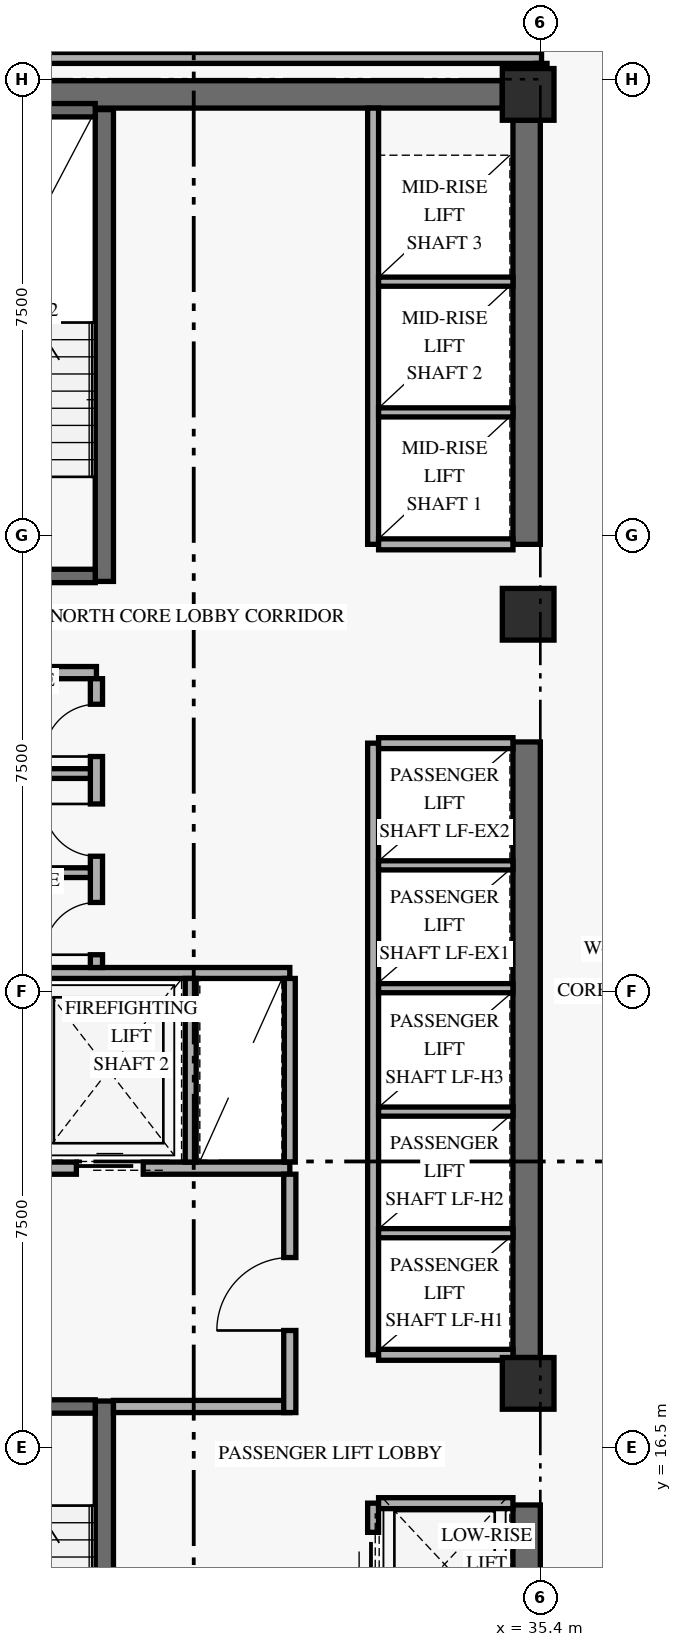
"""IFC4 building model, lengths in metres.
Left out: names, types, materials, properties, quantities, classifications, styles, units other than length and angle.
Written with IfcOpenShell. Run it as: python <this file> out.ifc"""

import sys

from ifc_helpers import new_model, si_unit, direction, frame, frame_2d, origin, origin_2d, place, context, subcontext, project, spatial, rectangle, extrude, element, fill, save


model = new_model("IFC4")
c1 = context("Model", 3, precision=1e-05, world=origin(), true_north=direction((0.0, 1.0)))
c2 = subcontext(c1, "Body", "Model", "MODEL_VIEW")
j1 = project(units=[si_unit("LENGTHUNIT", "METRE"), si_unit("PLANEANGLEUNIT", "RADIAN")], contexts=[c1])
p1 = place(None, origin())
s1 = spatial("IfcSite", under=j1, at=p1, CompositionType="ELEMENT")
p2 = place(p1, origin())
s2 = spatial("IfcBuilding", under=s1, at=p2, CompositionType="ELEMENT")
p3 = place(p2, frame((0.0, 0.0, 31.2)))
s3 = spatial("IfcBuildingStorey", under=s2, at=p3, CompositionType="ELEMENT", Elevation=31.2)
p4 = place(p3, frame((35.175, 9.675, 0.0), z_axis=(0.0, 0.0, 1.0), x_axis=(0.0, 1.0, 0.0)))
e1 = element("IfcWall", 1, at=p4, inside=s3, PredefinedType="SHEAR", context=c2, shape_type="SweptSolid", body=[
    extrude(rectangle(XDim=5.875, YDim=0.45, at=frame_2d((2.938, 0.0))), origin(), (0.0, 0.0, 1.0), 2.667),
])
p5 = place(p3, frame((35.175, 17.975, 0.0), z_axis=(0.0, 0.0, 1.0), x_axis=(0.0, 1.0, 0.0)))
e2 = element("IfcWall", 2, at=p5, inside=s3, PredefinedType="SHEAR", context=c2, shape_type="SweptSolid", body=[
    extrude(rectangle(XDim=10.125, YDim=0.45, at=frame_2d((5.062, 0.0))), origin(), (0.0, 0.0, 1.0), 2.667),
])
p6 = place(p3, frame((35.175, 31.35, 0.0), z_axis=(0.0, 0.0, 1.0), x_axis=(0.0, 1.0, 0.0)))
e3 = element("IfcWall", 3, at=p6, inside=s3, PredefinedType="SHEAR", context=c2, shape_type="SweptSolid", body=[
    extrude(rectangle(XDim=6.975, YDim=0.45, at=frame_2d((3.487, 0.0))), origin(), (0.0, 0.0, 1.0), 2.667),
])
p7 = place(p3, frame((24.625, 38.75, 0.0), z_axis=(0.0, 0.0, 1.0), x_axis=(1.0, 0.0, 0.0)))
e4 = element("IfcWall", 4, at=p7, inside=s3, PredefinedType="SHEAR", context=c2, shape_type="SweptSolid", body=[
    extrude(rectangle(XDim=10.15, YDim=0.45, at=frame_2d((5.075, 0.0))), origin(), (0.0, 0.0, 1.0), 3.36),
])
p8 = place(p3, frame((28.23, 9.5, 0.0), z_axis=(0.0, 0.0, 1.0), x_axis=(0.0, 1.0, 0.0)))
e5 = element("IfcWall", 5, at=p8, inside=s3, PredefinedType="SHEAR", context=c2, shape_type="SweptSolid", body=[
    extrude(rectangle(XDim=7.76, YDim=0.3, at=frame_2d((3.88, 0.0))), origin(), (0.0, 0.0, 1.0), 3.36),
])
p9 = place(p3, frame((24.92, 17.17, 0.0), z_axis=(0.0, 0.0, 1.0), x_axis=(1.0, 0.0, 0.0)))
e6 = element("IfcWall", 6, at=p9, inside=s3, PredefinedType="SHEAR", context=c2, shape_type="SweptSolid", body=[
    extrude(rectangle(XDim=3.16, YDim=0.22, at=frame_2d((1.58, 0.0))), origin(), (0.0, 0.0, 1.0), 3.36),
])
p10 = place(p9, frame((0.78, 0.0, 0.0)))
e7 = element("IfcOpeningElement", 7, at=p10, cuts=e6, PredefinedType="OPENING", context=c2, shape_type="SweptSolid", body=[
    extrude(rectangle(XDim=1.05, YDim=2.15, at=frame_2d((0.525, 1.075))), frame((0.0, 0.12, 0.0), z_axis=(0.0, -1.0, 0.0), x_axis=(1.0, 0.0, 0.0)), (0.0, 0.0, 1.0), 0.24),
])
p11 = place(p3, frame((28.23, 30.74, 0.0), z_axis=(0.0, 0.0, 1.0), x_axis=(0.0, 1.0, 0.0)))
e8 = element("IfcWall", 8, at=p11, inside=s3, PredefinedType="SHEAR", context=c2, shape_type="SweptSolid", body=[
    extrude(rectangle(XDim=7.76, YDim=0.3, at=frame_2d((3.88, 0.0))), origin(), (0.0, 0.0, 1.0), 3.36),
])
p12 = place(p3, frame((24.92, 30.83, 0.0), z_axis=(0.0, 0.0, 1.0), x_axis=(1.0, 0.0, 0.0)))
e9 = element("IfcWall", 9, at=p12, inside=s3, PredefinedType="SHEAR", context=c2, shape_type="SweptSolid", body=[
    extrude(rectangle(XDim=3.16, YDim=0.22, at=frame_2d((1.58, 0.0))), origin(), (0.0, 0.0, 1.0), 3.36),
])
p13 = place(p12, frame((0.78, 0.0, 0.0)))
e10 = element("IfcOpeningElement", 10, at=p13, cuts=e9, PredefinedType="OPENING", context=c2, shape_type="SweptSolid", body=[
    extrude(rectangle(XDim=1.05, YDim=2.15, at=frame_2d((0.525, 1.075))), frame((0.0, 0.12, 0.0), z_axis=(0.0, -1.0, 0.0), x_axis=(1.0, 0.0, 0.0)), (0.0, 0.0, 1.0), 0.24),
])
p14 = place(p3, frame((24.92, 38.49, 0.0), z_axis=(0.0, 0.0, 1.0), x_axis=(1.0, 0.0, 0.0)))
e11 = element("IfcWall", 11, at=p14, inside=s3, PredefinedType="SHEAR", context=c2, shape_type="SweptSolid", body=[
    extrude(rectangle(XDim=3.16, YDim=0.22, at=frame_2d((1.58, 0.0))), origin(), (0.0, 0.0, 1.0), 3.36),
])
for number, where, z_axis, x_axis in (
    (12, (35.2, 17.55, 0.0), (0.0, 0.0, 1.0), (1.0, 0.0, 0.0)),
    (13, (35.2, 30.2, 0.0), (0.0, 0.0, 1.0), (1.0, 0.0, 0.0)),
    (14, (35.2, 38.75, 0.0), (0.0, 0.0, 1.0), (1.0, 0.0, 0.0)),
):
    element("IfcColumn", number, at=place(p3, frame(where, z_axis=z_axis, x_axis=x_axis)), inside=s3, PredefinedType="COLUMN", context=c2, shape_type="SweptSolid", body=[
        extrude(rectangle(XDim=0.85, YDim=0.85, at=origin_2d()), origin(), (0.0, 0.0, 1.0), 3.6),
    ])
p15 = place(p3, frame((24.45, 21.09, 0.0), z_axis=(0.0, 0.0, 1.0), x_axis=(1.0, 0.0, 0.0)))
e15 = element("IfcWall", 15, at=p15, inside=s3, PredefinedType="STANDARD", context=c2, shape_type="SweptSolid", body=[
    extrude(rectangle(XDim=6.83, YDim=0.2, at=frame_2d((3.415, 0.0))), origin(), (0.0, 0.0, 1.0), 3.36),
])
p16 = place(p15, frame((0.72, 0.0, 0.0)))
e16 = element("IfcOpeningElement", 16, at=p16, cuts=e15, PredefinedType="OPENING", context=c2, shape_type="SweptSolid", body=[
    extrude(rectangle(XDim=1.1, YDim=2.2, at=frame_2d((0.55, 1.1))), frame((0.0, 0.11, 0.0), z_axis=(0.0, -1.0, 0.0), x_axis=(1.0, 0.0, 0.0)), (0.0, 0.0, 1.0), 0.22),
])
p17 = place(p15, frame((3.32, 0.0, 0.0)))
e17 = element("IfcOpeningElement", 17, at=p17, cuts=e15, PredefinedType="OPENING", context=c2, shape_type="SweptSolid", body=[
    extrude(rectangle(XDim=1.1, YDim=2.2, at=frame_2d((0.55, 1.1))), frame((0.0, 0.11, 0.0), z_axis=(0.0, -1.0, 0.0), x_axis=(1.0, 0.0, 0.0)), (0.0, 0.0, 1.0), 0.22),
])
p18 = place(p3, frame((28.38, 17.17, 0.0), z_axis=(0.0, 0.0, 1.0), x_axis=(1.0, 0.0, 0.0)))
e18 = element("IfcWall", 18, at=p18, inside=s3, PredefinedType="STANDARD", context=c2, shape_type="SweptSolid", body=[
    extrude(rectangle(XDim=2.9, YDim=0.2, at=frame_2d((1.45, 0.0))), origin(), (0.0, 0.0, 1.0), 3.36),
])
p19 = place(p3, frame((31.28, 17.07, 0.0), z_axis=(0.0, 0.0, 1.0), x_axis=(0.0, 1.0, 0.0)))
e19 = element("IfcWall", 19, at=p19, inside=s3, PredefinedType="STANDARD", context=c2, shape_type="SweptSolid", body=[
    extrude(rectangle(XDim=3.92, YDim=0.2, at=frame_2d((1.96, 0.0))), origin(), (0.0, 0.0, 1.0), 2.649),
])
p20 = place(p19, frame((1.35, 0.0, 0.0)))
e20 = element("IfcOpeningElement", 20, at=p20, cuts=e19, PredefinedType="OPENING", context=c2, shape_type="SweptSolid", body=[
    extrude(rectangle(XDim=1.2, YDim=2.15, at=frame_2d((0.6, 1.075))), frame((0.0, 0.11, 0.0), z_axis=(0.0, -1.0, 0.0), x_axis=(1.0, 0.0, 0.0)), (0.0, 0.0, 1.0), 0.22),
])
p21 = place(p3, frame((24.45, 24.3, 0.0), z_axis=(0.0, 0.0, 1.0), x_axis=(1.0, 0.0, 0.0)))
e21 = element("IfcWall", 21, at=p21, inside=s3, PredefinedType="STANDARD", context=c2, shape_type="SweptSolid", body=[
    extrude(rectangle(XDim=6.83, YDim=0.18, at=frame_2d((3.415, 0.0))), origin(), (0.0, 0.0, 1.0), 3.36),
])
for number, where, z_axis, x_axis in (
    (22, (29.65, 21.19, 0.0), (0.0, 0.0, 1.0), (0.0, 1.0, 0.0)),
    (23, (31.28, 21.19, 0.0), (0.0, 0.0, 1.0), (0.0, 1.0, 0.0)),
):
    element("IfcWall", number, at=place(p3, frame(where, z_axis=z_axis, x_axis=x_axis)), inside=s3, PredefinedType="STANDARD", context=c2, shape_type="SweptSolid", body=[
        extrude(rectangle(XDim=3.02, YDim=0.18, at=frame_2d((1.51, 0.0))), origin(), (0.0, 0.0, 1.0), 3.36),
    ])
p22 = place(p3, frame((24.45, 29.24, 0.0), z_axis=(0.0, 0.0, 1.0), x_axis=(1.0, 0.0, 0.0)))
e24 = element("IfcWall", 24, at=p22, inside=s3, PredefinedType="STANDARD", context=c2, shape_type="SweptSolid", body=[
    extrude(rectangle(XDim=3.65, YDim=0.2, at=frame_2d((1.825, 0.0))), origin(), (0.0, 0.0, 1.0), 3.36),
])
p23 = place(p3, frame((28.1, 24.39, 0.0), z_axis=(0.0, 0.0, 1.0), x_axis=(0.0, 1.0, 0.0)))
e25 = element("IfcWall", 25, at=p23, inside=s3, PredefinedType="STANDARD", context=c2, shape_type="SweptSolid", body=[
    extrude(rectangle(XDim=4.75, YDim=0.2, at=frame_2d((2.375, 0.0))), origin(), (0.0, 0.0, 1.0), 3.36),
])
p24 = place(p23, frame((0.21, 0.0, 0.0)))
e26 = element("IfcOpeningElement", 26, at=p24, cuts=e25, PredefinedType="OPENING", context=c2, shape_type="SweptSolid", body=[
    extrude(rectangle(XDim=0.86, YDim=2.1, at=frame_2d((0.43, 1.05))), frame((0.0, 0.11, 0.0), z_axis=(0.0, -1.0, 0.0), x_axis=(1.0, 0.0, 0.0)), (0.0, 0.0, 1.0), 0.22),
])
p25 = place(p23, frame((1.83, 0.0, 0.0)))
e27 = element("IfcOpeningElement", 27, at=p25, cuts=e25, PredefinedType="OPENING", context=c2, shape_type="SweptSolid", body=[
    extrude(rectangle(XDim=0.86, YDim=2.1, at=frame_2d((0.43, 1.05))), frame((0.0, 0.11, 0.0), z_axis=(0.0, -1.0, 0.0), x_axis=(1.0, 0.0, 0.0)), (0.0, 0.0, 1.0), 0.22),
])
p26 = place(p23, frame((3.47, 0.0, 0.0)))
e28 = element("IfcOpeningElement", 28, at=p26, cuts=e25, PredefinedType="OPENING", context=c2, shape_type="SweptSolid", body=[
    extrude(rectangle(XDim=0.86, YDim=2.1, at=frame_2d((0.43, 1.05))), frame((0.0, 0.11, 0.0), z_axis=(0.0, -1.0, 0.0), x_axis=(1.0, 0.0, 0.0)), (0.0, 0.0, 1.0), 0.22),
])
for number, where, z_axis, x_axis in (
    (29, (24.45, 25.95, 0.0), (0.0, 0.0, 1.0), (1.0, 0.0, 0.0)),
    (30, (24.45, 27.58, 0.0), (0.0, 0.0, 1.0), (1.0, 0.0, 0.0)),
):
    element("IfcWall", number, at=place(p3, frame(where, z_axis=z_axis, x_axis=x_axis)), inside=s3, PredefinedType="PARTITIONING", context=c2, shape_type="SweptSolid", body=[
        extrude(rectangle(XDim=3.55, YDim=0.16, at=frame_2d((1.775, 0.0))), origin(), (0.0, 0.0, 1.0), 3.36),
    ])
p27 = place(p3, frame((32.65, 9.5, 0.0), z_axis=(0.0, 0.0, 1.0), x_axis=(0.0, 1.0, 0.0)))
e31 = element("IfcWall", 31, at=p27, inside=s3, PredefinedType="STANDARD", context=c2, shape_type="SweptSolid", body=[
    extrude(rectangle(XDim=6.08, YDim=0.18, at=frame_2d((3.04, 0.0))), origin(), (0.0, 0.0, 1.0), 3.36),
])
p28 = place(p27, frame((0.55, 0.0, 0.0)))
e32 = element("IfcOpeningElement", 32, at=p28, cuts=e31, PredefinedType="OPENING", context=c2, shape_type="SweptSolid", body=[
    extrude(rectangle(XDim=1.05, YDim=2.2, at=frame_2d((0.525, 1.1))), frame((0.0, 0.1, 0.0), z_axis=(0.0, -1.0, 0.0), x_axis=(1.0, 0.0, 0.0)), (0.0, 0.0, 1.0), 0.2),
])
p29 = place(p27, frame((2.55, 0.0, 0.0)))
e33 = element("IfcOpeningElement", 33, at=p29, cuts=e31, PredefinedType="OPENING", context=c2, shape_type="SweptSolid", body=[
    extrude(rectangle(XDim=1.05, YDim=2.2, at=frame_2d((0.525, 1.1))), frame((0.0, 0.1, 0.0), z_axis=(0.0, -1.0, 0.0), x_axis=(1.0, 0.0, 0.0)), (0.0, 0.0, 1.0), 0.2),
])
p30 = place(p27, frame((4.55, 0.0, 0.0)))
e34 = element("IfcOpeningElement", 34, at=p30, cuts=e31, PredefinedType="OPENING", context=c2, shape_type="SweptSolid", body=[
    extrude(rectangle(XDim=1.05, YDim=2.2, at=frame_2d((0.525, 1.1))), frame((0.0, 0.1, 0.0), z_axis=(0.0, -1.0, 0.0), x_axis=(1.0, 0.0, 0.0)), (0.0, 0.0, 1.0), 0.2),
])
p31 = place(p3, frame((32.74, 15.58, 0.0), z_axis=(0.0, 0.0, 1.0), x_axis=(1.0, 0.0, 0.0)))
e35 = element("IfcWall", 35, at=p31, inside=s3, PredefinedType="STANDARD", context=c2, shape_type="SweptSolid", body=[
    extrude(rectangle(XDim=2.21, YDim=0.18, at=frame_2d((1.105, 0.0))), origin(), (0.0, 0.0, 1.0), 3.36),
])
p32 = place(p3, frame((32.65, 18.02, 0.0), z_axis=(0.0, 0.0, 1.0), x_axis=(0.0, 1.0, 0.0)))
e36 = element("IfcWall", 36, at=p32, inside=s3, PredefinedType="STANDARD", context=c2, shape_type="SweptSolid", body=[
    extrude(rectangle(XDim=10.06, YDim=0.18, at=frame_2d((5.03, 0.0))), origin(), (0.0, 0.0, 1.0), 3.36),
])
for number, where, z_axis, x_axis in (
    (37, (32.74, 18.02, 0.0), (0.0, 0.0, 1.0), (1.0, 0.0, 0.0)),
    (38, (32.74, 28.08, 0.0), (0.0, 0.0, 1.0), (1.0, 0.0, 0.0)),
):
    element("IfcWall", number, at=place(p3, frame(where, z_axis=z_axis, x_axis=x_axis)), inside=s3, PredefinedType="STANDARD", context=c2, shape_type="SweptSolid", body=[
        extrude(rectangle(XDim=2.21, YDim=0.18, at=frame_2d((1.105, 0.0))), origin(), (0.0, 0.0, 1.0), 3.36),
    ])
for number, where, z_axis, x_axis in (
    (39, (32.74, 20.02, 0.0), (0.0, 0.0, 1.0), (1.0, 0.0, 0.0)),
    (40, (32.74, 22.02, 0.0), (0.0, 0.0, 1.0), (1.0, 0.0, 0.0)),
    (41, (32.74, 24.05, 0.0), (0.0, 0.0, 1.0), (1.0, 0.0, 0.0)),
    (42, (32.74, 26.07, 0.0), (0.0, 0.0, 1.0), (1.0, 0.0, 0.0)),
):
    element("IfcWall", number, at=place(p3, frame(where, z_axis=z_axis, x_axis=x_axis)), inside=s3, PredefinedType="STANDARD", context=c2, shape_type="SweptSolid", body=[
        extrude(rectangle(XDim=2.21, YDim=0.15, at=frame_2d((1.105, 0.0))), origin(), (0.0, 0.0, 1.0), 3.36),
    ])
p33 = place(p3, frame((32.65, 31.35, 0.0), z_axis=(0.0, 0.0, 1.0), x_axis=(0.0, 1.0, 0.0)))
e43 = element("IfcWall", 43, at=p33, inside=s3, PredefinedType="STANDARD", context=c2, shape_type="SweptSolid", body=[
    extrude(rectangle(XDim=7.175, YDim=0.18, at=frame_2d((3.587, 0.0))), origin(), (0.0, 0.0, 1.0), 3.36),
])
p34 = place(p3, frame((32.74, 31.35, 0.0), z_axis=(0.0, 0.0, 1.0), x_axis=(1.0, 0.0, 0.0)))
e44 = element("IfcWall", 44, at=p34, inside=s3, PredefinedType="STANDARD", context=c2, shape_type="SweptSolid", body=[
    extrude(rectangle(XDim=2.21, YDim=0.18, at=frame_2d((1.105, 0.0))), origin(), (0.0, 0.0, 1.0), 3.36),
])
for number, where, z_axis, x_axis in (
    (45, (32.74, 33.52, 0.0), (0.0, 0.0, 1.0), (1.0, 0.0, 0.0)),
    (46, (32.74, 35.67, 0.0), (0.0, 0.0, 1.0), (1.0, 0.0, 0.0)),
):
    element("IfcWall", number, at=place(p3, frame(where, z_axis=z_axis, x_axis=x_axis)), inside=s3, PredefinedType="STANDARD", context=c2, shape_type="SweptSolid", body=[
        extrude(rectangle(XDim=2.21, YDim=0.15, at=frame_2d((1.105, 0.0))), origin(), (0.0, 0.0, 1.0), 3.36),
    ])
p35 = place(p3, frame((23.75, 39.35, 0.0), z_axis=(0.0, 0.0, 1.0), x_axis=(1.0, 0.0, 0.0)))
e47 = element("IfcWall", 47, at=p35, inside=s3, PredefinedType="STANDARD", context=c2, shape_type="SweptSolid", body=[
    extrude(rectangle(XDim=11.67, YDim=0.18, at=frame_2d((5.835, 0.0))), origin(), (0.0, 0.0, 1.0), 2.649),
])
p36 = place(p3, frame((35.42, 38.75, 0.0), z_axis=(0.0, 0.0, 1.0), x_axis=(0.0, 1.0, 0.0)))
e48 = element("IfcWall", 48, at=p36, inside=s3, PredefinedType="STANDARD", context=c2, shape_type="SweptSolid", body=[
    extrude(rectangle(XDim=0.51, YDim=0.18, at=frame_2d((0.255, 0.0))), origin(), (0.0, 0.0, 1.0), 3.36),
])
p37 = place(p17, origin())
e49 = element("IfcDoor", 49, at=p37, inside=s3, OperationType="SLIDING_TO_LEFT", PredefinedType="DOOR", context=c2, shape_type="SweptSolid", body=[
    extrude(rectangle(XDim=1.1, YDim=2.2, at=frame_2d((0.55, 1.1))), frame((0.0, 0.025, 0.0), z_axis=(0.0, -1.0, 0.0), x_axis=(1.0, 0.0, 0.0)), (0.0, 0.0, 1.0), 0.05),
])
fill(e17, e49)
p38 = place(p20, origin())
e50 = element("IfcDoor", 50, at=p38, inside=s3, OperationType="SINGLE_SWING_LEFT", PredefinedType="DOOR", context=c2, shape_type="SweptSolid", body=[
    extrude(rectangle(XDim=1.2, YDim=2.15, at=frame_2d((0.6, 1.075))), frame((0.0, 0.025, 0.0), z_axis=(0.0, -1.0, 0.0), x_axis=(1.0, 0.0, 0.0)), (0.0, 0.0, 1.0), 0.05),
])
fill(e20, e50)
p39 = place(p24, origin())
e51 = element("IfcDoor", 51, at=p39, inside=s3, OperationType="SINGLE_SWING_LEFT", PredefinedType="DOOR", context=c2, shape_type="SweptSolid", body=[
    extrude(rectangle(XDim=0.86, YDim=2.1, at=frame_2d((0.43, 1.05))), frame((0.0, 0.025, 0.0), z_axis=(0.0, -1.0, 0.0), x_axis=(1.0, 0.0, 0.0)), (0.0, 0.0, 1.0), 0.05),
])
fill(e26, e51)
p40 = place(p25, origin())
e52 = element("IfcDoor", 52, at=p40, inside=s3, OperationType="SINGLE_SWING_RIGHT", PredefinedType="DOOR", context=c2, shape_type="SweptSolid", body=[
    extrude(rectangle(XDim=0.86, YDim=2.1, at=frame_2d((0.43, 1.05))), frame((0.0, 0.025, 0.0), z_axis=(0.0, -1.0, 0.0), x_axis=(1.0, 0.0, 0.0)), (0.0, 0.0, 1.0), 0.05),
])
fill(e27, e52)
p41 = place(p26, origin())
e53 = element("IfcDoor", 53, at=p41, inside=s3, OperationType="SINGLE_SWING_LEFT", PredefinedType="DOOR", context=c2, shape_type="SweptSolid", body=[
    extrude(rectangle(XDim=0.86, YDim=2.1, at=frame_2d((0.43, 1.05))), frame((0.0, 0.025, 0.0), z_axis=(0.0, -1.0, 0.0), x_axis=(1.0, 0.0, 0.0)), (0.0, 0.0, 1.0), 0.05),
])
fill(e28, e53)
p42 = place(p30, origin())
e54 = element("IfcDoor", 54, at=p42, inside=s3, OperationType="SLIDING_TO_LEFT", PredefinedType="DOOR", context=c2, shape_type="SweptSolid", body=[
    extrude(rectangle(XDim=1.05, YDim=2.2, at=frame_2d((0.525, 1.1))), frame((0.0, 0.025, 0.0), z_axis=(0.0, -1.0, 0.0), x_axis=(1.0, 0.0, 0.0)), (0.0, 0.0, 1.0), 0.05),
])
fill(e34, e54)
save(model, sys.argv[1])
